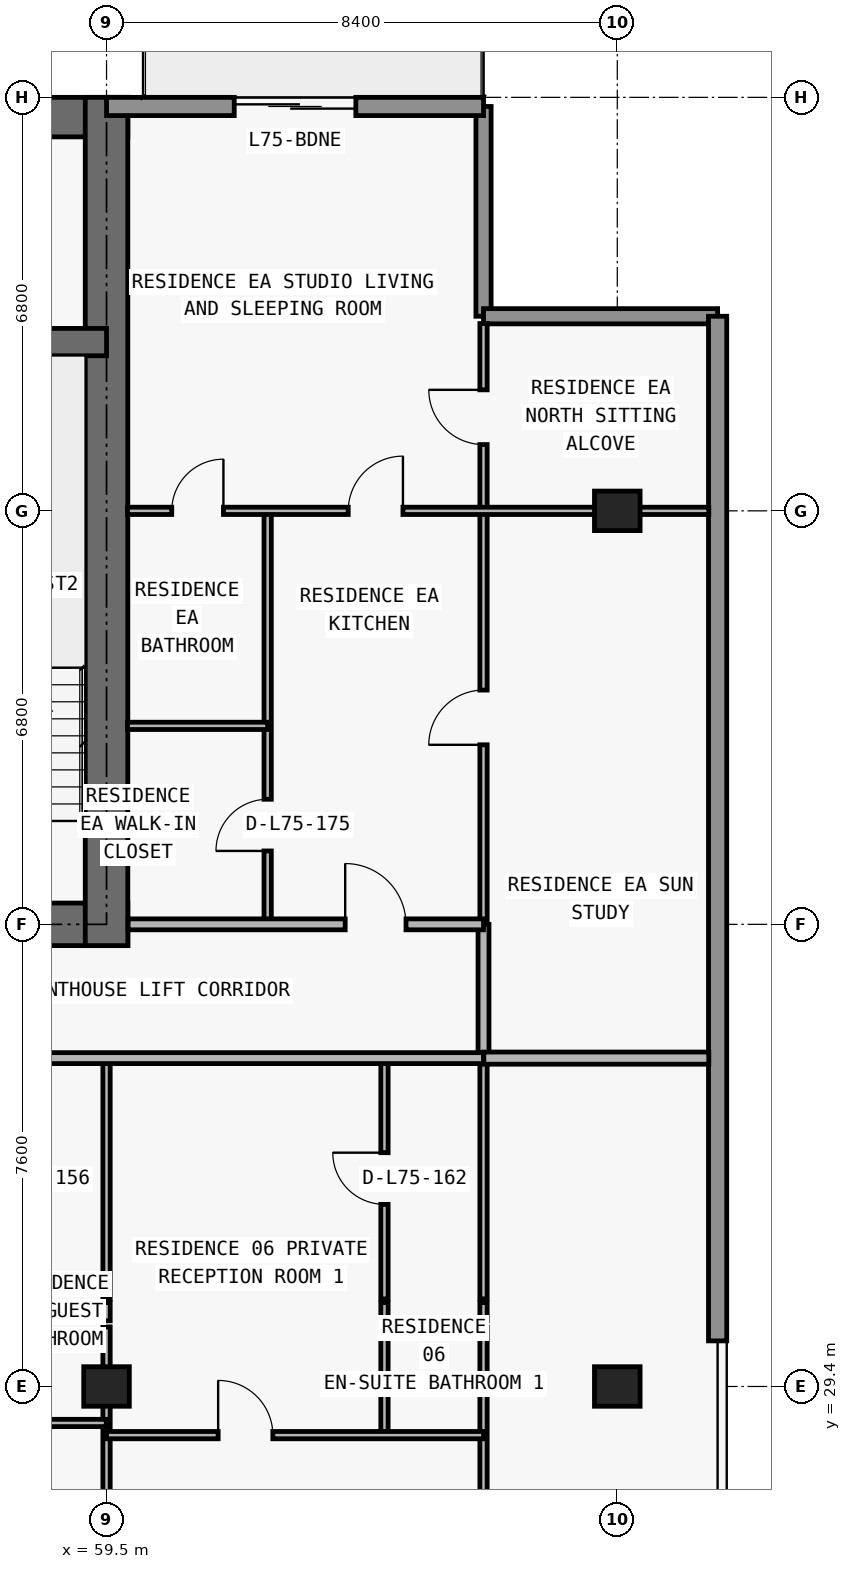
"""IFC4 building model, lengths in metres.
Left out: names, types, materials, properties, quantities, classifications, styles, units other than length and angle.
Written with IfcOpenShell. Run it as: python <this file> out.ifc"""

import sys

from ifc_helpers import new_model, si_unit, direction, frame, frame_2d, origin, origin_2d, place, context, subcontext, project, spatial, rectangle, extrude, element, fill, save


model = new_model("IFC4")
c1 = context("Model", 3, precision=1e-05, world=origin(), true_north=direction((0.0, 1.0)))
c2 = subcontext(c1, "Body", "Model", "MODEL_VIEW")
j1 = project(units=[si_unit("LENGTHUNIT", "METRE"), si_unit("PLANEANGLEUNIT", "RADIAN")], contexts=[c1])
p1 = place(None, origin())
s1 = spatial("IfcSite", under=j1, at=p1, CompositionType="ELEMENT")
p2 = place(p1, origin())
s2 = spatial("IfcBuilding", under=s1, at=p2, CompositionType="ELEMENT")
p3 = place(p2, frame((0.0, 0.0, 266.1)))
s3 = spatial("IfcBuildingStorey", under=s2, at=p3, CompositionType="ELEMENT", Elevation=266.1)
for number, where, z_axis, x_axis in (
    (1, (59.5, 29.4, 0.0), (0.0, 0.0, 1.0), (1.0, 0.0, 0.0)),
    (2, (67.9, 29.4, 0.0), (0.0, 0.0, 1.0), (1.0, 0.0, 0.0)),
    (3, (67.9, 43.8, 0.0), (0.0, 0.0, 1.0), (1.0, 0.0, 0.0)),
):
    element("IfcColumn", number, at=place(p3, frame(where, z_axis=z_axis, x_axis=x_axis)), inside=s3, PredefinedType="COLUMN", context=c2, shape_type="SweptSolid", body=[
        extrude(rectangle(XDim=0.75, YDim=0.65, at=origin_2d()), origin(), (0.0, 0.0, 1.0), 3.0),
    ])
p4 = place(p3, frame((17.95, 37.0, 0.0), z_axis=(0.0, 0.0, 1.0), x_axis=(1.0, 0.0, 0.0)))
e4 = element("IfcWall", 4, at=p4, inside=s3, PredefinedType="SHEAR", context=c2, shape_type="SweptSolid", body=[
    extrude(rectangle(XDim=41.9, YDim=0.7, at=frame_2d((20.95, 0.0))), origin(), (0.0, 0.0, 1.0), 3.0),
])
p5 = place(p4, frame((14.35, 0.0, 0.0)))
e5 = element("IfcOpeningElement", 5, at=p5, cuts=e4, PredefinedType="OPENING", context=c2, shape_type="SweptSolid", body=[
    extrude(rectangle(XDim=1.1, YDim=2.15, at=frame_2d((0.55, 1.075))), frame((0.0, 0.36, 0.0), z_axis=(0.0, -1.0, 0.0), x_axis=(1.0, 0.0, 0.0)), (0.0, 0.0, 1.0), 0.72),
])
p6 = place(p4, frame((6.2, 0.0, 0.0)))
e6 = element("IfcOpeningElement", 6, at=p6, cuts=e4, PredefinedType="OPENING", context=c2, shape_type="SweptSolid", body=[
    extrude(rectangle(XDim=1.05, YDim=2.15, at=frame_2d((0.525, 1.075))), frame((0.0, 0.36, 0.0), z_axis=(0.0, -1.0, 0.0), x_axis=(1.0, 0.0, 0.0)), (0.0, 0.0, 1.0), 0.72),
])
p7 = place(p4, frame((34.7, 0.0, 0.0)))
e7 = element("IfcOpeningElement", 7, at=p7, cuts=e4, PredefinedType="OPENING", context=c2, shape_type="SweptSolid", body=[
    extrude(rectangle(XDim=1.05, YDim=2.15, at=frame_2d((0.525, 1.075))), frame((0.0, 0.36, 0.0), z_axis=(0.0, -1.0, 0.0), x_axis=(1.0, 0.0, 0.0)), (0.0, 0.0, 1.0), 0.72),
])
p8 = place(p4, frame((10.812, 0.0, 0.0)))
e8 = element("IfcOpeningElement", 8, at=p8, cuts=e4, PredefinedType="OPENING", context=c2, shape_type="SweptSolid", body=[
    extrude(rectangle(XDim=1.05, YDim=2.15, at=frame_2d((0.525, 1.075))), frame((0.0, 0.36, 0.0), z_axis=(0.0, -1.0, 0.0), x_axis=(1.0, 0.0, 0.0)), (0.0, 0.0, 1.0), 0.72),
])
p9 = place(p4, frame((24.05, 0.0, 0.0)))
e9 = element("IfcOpeningElement", 9, at=p9, cuts=e4, PredefinedType="OPENING", context=c2, shape_type="SweptSolid", body=[
    extrude(rectangle(XDim=1.05, YDim=2.15, at=frame_2d((0.525, 1.075))), frame((0.0, 0.36, 0.0), z_axis=(0.0, -1.0, 0.0), x_axis=(1.0, 0.0, 0.0)), (0.0, 0.0, 1.0), 0.72),
])
p10 = place(p3, frame((17.95, 50.275, 0.0), z_axis=(0.0, 0.0, 1.0), x_axis=(1.0, 0.0, 0.0)))
e10 = element("IfcWall", 10, at=p10, inside=s3, PredefinedType="SHEAR", context=c2, shape_type="SweptSolid", body=[
    extrude(rectangle(XDim=41.9, YDim=0.65, at=frame_2d((20.95, 0.0))), origin(), (0.0, 0.0, 1.0), 3.0),
])
p11 = place(p3, frame((59.5, 36.65, 0.0), z_axis=(0.0, 0.0, 1.0), x_axis=(0.0, 1.0, 0.0)))
e11 = element("IfcWall", 11, at=p11, inside=s3, PredefinedType="SHEAR", context=c2, shape_type="SweptSolid", body=[
    extrude(rectangle(XDim=13.95, YDim=0.7, at=frame_2d((6.975, 0.0))), origin(), (0.0, 0.0, 1.0), 3.0),
])
p12 = place(p3, frame((18.3, 46.575, 0.0), z_axis=(0.0, 0.0, 1.0), x_axis=(1.0, 0.0, 0.0)))
e12 = element("IfcWall", 12, at=p12, inside=s3, PredefinedType="SHEAR", context=c2, shape_type="SweptSolid", body=[
    extrude(rectangle(XDim=41.2, YDim=0.45, at=frame_2d((20.6, 0.0))), origin(), (0.0, 0.0, 1.0), 3.0),
])
p13 = place(p12, frame((7.6, 0.0, 0.0)))
e13 = element("IfcOpeningElement", 13, at=p13, cuts=e12, PredefinedType="OPENING", context=c2, shape_type="SweptSolid", body=[
    extrude(rectangle(XDim=1.0, YDim=2.2, at=frame_2d((0.5, 1.1))), frame((0.0, 0.235, 0.0), z_axis=(0.0, -1.0, 0.0), x_axis=(1.0, 0.0, 0.0)), (0.0, 0.0, 1.0), 0.47),
])
p14 = place(p12, frame((32.625, 0.0, 0.0)))
e14 = element("IfcOpeningElement", 14, at=p14, cuts=e12, PredefinedType="OPENING", context=c2, shape_type="SweptSolid", body=[
    extrude(rectangle(XDim=1.05, YDim=2.15, at=frame_2d((0.525, 1.075))), frame((0.0, 0.235, 0.0), z_axis=(0.0, -1.0, 0.0), x_axis=(1.0, 0.0, 0.0)), (0.0, 0.0, 1.0), 0.47),
])
p15 = place(p3, frame((65.7, 50.45, 0.0), z_axis=(0.0, 0.0, 1.0), x_axis=(0.0, -1.0, 0.0)))
e15 = element("IfcWall", 15, at=p15, inside=s3, PredefinedType="ELEMENTEDWALL", context=c2, shape_type="SweptSolid", body=[
    extrude(rectangle(XDim=3.45, YDim=0.25, at=frame_2d((1.725, 0.0))), origin(), (0.0, 0.0, 1.0), 3.0),
])
p16 = place(p3, frame((65.7, 47.0, 0.0), z_axis=(0.0, 0.0, 1.0), x_axis=(1.0, 0.0, 0.0)))
e16 = element("IfcWall", 16, at=p16, inside=s3, PredefinedType="ELEMENTEDWALL", context=c2, shape_type="SweptSolid", body=[
    extrude(rectangle(XDim=3.85, YDim=0.25, at=frame_2d((1.925, 0.0))), origin(), (0.0, 0.0, 1.0), 3.0),
])
p17 = place(p3, frame((69.55, 47.0, 0.0), z_axis=(0.0, 0.0, 1.0), x_axis=(0.0, -1.0, 0.0)))
e17 = element("IfcWall", 17, at=p17, inside=s3, PredefinedType="STANDARD", context=c2, shape_type="SweptSolid", body=[
    extrude(rectangle(XDim=16.85, YDim=0.3, at=frame_2d((8.425, 0.0))), origin(), (0.0, 0.0, 1.0), 3.0),
])
p18 = place(p3, frame((59.5, 50.45, 0.0), z_axis=(0.0, 0.0, 1.0), x_axis=(1.0, 0.0, 0.0)))
e18 = element("IfcWall", 18, at=p18, inside=s3, PredefinedType="STANDARD", context=c2, shape_type="SweptSolid", body=[
    extrude(rectangle(XDim=6.2, YDim=0.3, at=frame_2d((3.1, 0.0))), origin(), (0.0, 0.0, 1.0), 3.0),
])
p19 = place(p18, frame((2.1, 0.0, 0.0)))
e19 = element("IfcOpeningElement", 19, at=p19, cuts=e18, PredefinedType="OPENING", context=c2, shape_type="SweptSolid", body=[
    extrude(rectangle(XDim=2.0, YDim=2.3, at=frame_2d((1.0, 1.15))), frame((0.0, 0.16, 0.0), z_axis=(0.0, -1.0, 0.0), x_axis=(1.0, 0.0, 0.0)), (0.0, 0.0, 1.0), 0.32),
])
p20 = place(p3, frame((59.5, 25.69, 0.0), z_axis=(0.0, 0.0, 1.0), x_axis=(0.0, 1.0, 0.0)))
e20 = element("IfcWall", 20, at=p20, inside=s3, PredefinedType="PARTITIONING", context=c2, shape_type="SweptSolid", body=[
    extrude(rectangle(XDim=4.69, YDim=0.12, at=frame_2d((2.345, 0.0))), origin(), (0.0, 0.0, 1.0), 2.213),
])
p21 = place(p20, frame((1.005, 0.0, 0.0)))
e21 = element("IfcOpeningElement", 21, at=p21, cuts=e20, PredefinedType="OPENING", context=c2, shape_type="SweptSolid", body=[
    extrude(rectangle(XDim=0.9, YDim=2.15, at=frame_2d((0.45, 1.075))), frame((0.0, 0.07, 0.0), z_axis=(0.0, -1.0, 0.0), x_axis=(1.0, 0.0, 0.0)), (0.0, 0.0, 1.0), 0.14),
])
p22 = place(p3, frame((59.5, 30.48, 0.0), z_axis=(0.0, 0.0, 1.0), x_axis=(0.0, 1.0, 0.0)))
e22 = element("IfcWall", 22, at=p22, inside=s3, PredefinedType="PARTITIONING", context=c2, shape_type="SweptSolid", body=[
    extrude(rectangle(XDim=0.3, YDim=0.12, at=frame_2d((0.15, 0.0))), origin(), (0.0, 0.0, 1.0), 2.213),
])
p23 = place(p3, frame((59.5, 30.84, 0.0), z_axis=(0.0, 0.0, 1.0), x_axis=(0.0, 1.0, 0.0)))
e23 = element("IfcWall", 23, at=p23, inside=s3, PredefinedType="PARTITIONING", context=c2, shape_type="SweptSolid", body=[
    extrude(rectangle(XDim=3.96, YDim=0.12, at=frame_2d((1.98, 0.0))), origin(), (0.0, 0.0, 1.0), 2.213),
])
p24 = place(p3, frame((62.15, 37.0, 0.0), z_axis=(0.0, 0.0, 1.0), x_axis=(0.0, 1.0, 0.0)))
e24 = element("IfcWall", 24, at=p24, inside=s3, PredefinedType="PARTITIONING", context=c2, shape_type="SweptSolid", body=[
    extrude(rectangle(XDim=6.8, YDim=0.12, at=frame_2d((3.4, 0.0))), origin(), (0.0, 0.0, 1.0), 3.0),
])
p25 = place(p24, frame((1.207, 0.0, 0.0)))
e25 = element("IfcOpeningElement", 25, at=p25, cuts=e24, PredefinedType="OPENING", context=c2, shape_type="SweptSolid", body=[
    extrude(rectangle(XDim=0.85, YDim=2.1, at=frame_2d((0.425, 1.05))), frame((0.0, 0.07, 0.0), z_axis=(0.0, -1.0, 0.0), x_axis=(1.0, 0.0, 0.0)), (0.0, 0.0, 1.0), 0.14),
])
p26 = place(p3, frame((64.071, 28.6, 0.0), z_axis=(0.0, 0.0, 1.0), x_axis=(0.0, 1.0, 0.0)))
e26 = element("IfcWall", 26, at=p26, inside=s3, PredefinedType="PARTITIONING", context=c2, shape_type="SweptSolid", body=[
    extrude(rectangle(XDim=1.78, YDim=0.12, at=frame_2d((0.89, 0.0))), origin(), (0.0, 0.0, 1.0), 3.0),
])
p27 = place(p3, frame((64.071, 30.48, 0.0), z_axis=(0.0, 0.0, 1.0), x_axis=(0.0, 1.0, 0.0)))
e27 = element("IfcWall", 27, at=p27, inside=s3, PredefinedType="PARTITIONING", context=c2, shape_type="SweptSolid", body=[
    extrude(rectangle(XDim=0.3, YDim=0.12, at=frame_2d((0.15, 0.0))), origin(), (0.0, 0.0, 1.0), 3.0),
])
p28 = place(p3, frame((64.071, 30.84, 0.0), z_axis=(0.0, 0.0, 1.0), x_axis=(0.0, 1.0, 0.0)))
e28 = element("IfcWall", 28, at=p28, inside=s3, PredefinedType="PARTITIONING", context=c2, shape_type="SweptSolid", body=[
    extrude(rectangle(XDim=3.96, YDim=0.12, at=frame_2d((1.98, 0.0))), origin(), (0.0, 0.0, 1.0), 3.0),
])
p29 = place(p28, frame((1.555, 0.0, 0.0)))
e29 = element("IfcOpeningElement", 29, at=p29, cuts=e28, PredefinedType="OPENING", context=c2, shape_type="SweptSolid", body=[
    extrude(rectangle(XDim=0.85, YDim=2.1, at=frame_2d((0.425, 1.05))), frame((0.0, 0.07, 0.0), z_axis=(0.0, -1.0, 0.0), x_axis=(1.0, 0.0, 0.0)), (0.0, 0.0, 1.0), 0.14),
])
p30 = place(p3, frame((65.7, 25.69, 0.0), z_axis=(0.0, 0.0, 1.0), x_axis=(0.0, 1.0, 0.0)))
e30 = element("IfcWall", 30, at=p30, inside=s3, PredefinedType="PARTITIONING", context=c2, shape_type="SweptSolid", body=[
    extrude(rectangle(XDim=4.69, YDim=0.12, at=frame_2d((2.345, 0.0))), origin(), (0.0, 0.0, 1.0), 3.0),
])
p31 = place(p30, frame((1.005, 0.0, 0.0)))
e31 = element("IfcOpeningElement", 31, at=p31, cuts=e30, PredefinedType="OPENING", context=c2, shape_type="SweptSolid", body=[
    extrude(rectangle(XDim=0.9, YDim=2.15, at=frame_2d((0.45, 1.075))), frame((0.0, 0.07, 0.0), z_axis=(0.0, -1.0, 0.0), x_axis=(1.0, 0.0, 0.0)), (0.0, 0.0, 1.0), 0.14),
])
p32 = place(p3, frame((65.7, 30.48, 0.0), z_axis=(0.0, 0.0, 1.0), x_axis=(0.0, 1.0, 0.0)))
e32 = element("IfcWall", 32, at=p32, inside=s3, PredefinedType="PARTITIONING", context=c2, shape_type="SweptSolid", body=[
    extrude(rectangle(XDim=0.3, YDim=0.12, at=frame_2d((0.15, 0.0))), origin(), (0.0, 0.0, 1.0), 3.0),
])
p33 = place(p3, frame((65.7, 30.84, 0.0), z_axis=(0.0, 0.0, 1.0), x_axis=(0.0, 1.0, 0.0)))
e33 = element("IfcWall", 33, at=p33, inside=s3, PredefinedType="PARTITIONING", context=c2, shape_type="SweptSolid", body=[
    extrude(rectangle(XDim=3.96, YDim=0.12, at=frame_2d((1.98, 0.0))), origin(), (0.0, 0.0, 1.0), 3.0),
])
p34 = place(p3, frame((65.7, 34.805, 0.0), z_axis=(0.0, 0.0, 1.0), x_axis=(0.0, 1.0, 0.0)))
e34 = element("IfcWall", 34, at=p34, inside=s3, PredefinedType="PARTITIONING", context=c2, shape_type="SweptSolid", body=[
    extrude(rectangle(XDim=2.195, YDim=0.18, at=frame_2d((1.098, 0.0))), origin(), (0.0, 0.0, 1.0), 3.0),
])
p35 = place(p3, frame((65.7, 37.005, 0.0), z_axis=(0.0, 0.0, 1.0), x_axis=(0.0, 1.0, 0.0)))
e35 = element("IfcWall", 35, at=p35, inside=s3, PredefinedType="PARTITIONING", context=c2, shape_type="SweptSolid", body=[
    extrude(rectangle(XDim=9.875, YDim=0.12, at=frame_2d((4.938, 0.0))), origin(), (0.0, 0.0, 1.0), 3.0),
])
p36 = place(p35, frame((2.948, 0.0, 0.0)))
e36 = element("IfcOpeningElement", 36, at=p36, cuts=e35, PredefinedType="OPENING", context=c2, shape_type="SweptSolid", body=[
    extrude(rectangle(XDim=0.9, YDim=2.15, at=frame_2d((0.45, 1.075))), frame((0.0, 0.07, 0.0), z_axis=(0.0, -1.0, 0.0), x_axis=(1.0, 0.0, 0.0)), (0.0, 0.0, 1.0), 0.14),
])
p37 = place(p35, frame((7.885, 0.0, 0.0)))
e37 = element("IfcOpeningElement", 37, at=p37, cuts=e35, PredefinedType="OPENING", context=c2, shape_type="SweptSolid", body=[
    extrude(rectangle(XDim=0.9, YDim=2.15, at=frame_2d((0.45, 1.075))), frame((0.0, 0.07, 0.0), z_axis=(0.0, -1.0, 0.0), x_axis=(1.0, 0.0, 0.0)), (0.0, 0.0, 1.0), 0.14),
])
p38 = place(p3, frame((59.5, 28.6, 0.0), z_axis=(0.0, 0.0, 1.0), x_axis=(1.0, 0.0, 0.0)))
e38 = element("IfcWall", 38, at=p38, inside=s3, PredefinedType="PARTITIONING", context=c2, shape_type="SweptSolid", body=[
    extrude(rectangle(XDim=6.2, YDim=0.12, at=frame_2d((3.1, 0.0))), origin(), (0.0, 0.0, 1.0), 3.0),
])
p39 = place(p38, frame((1.835, 0.0, 0.0)))
e39 = element("IfcOpeningElement", 39, at=p39, cuts=e38, PredefinedType="OPENING", context=c2, shape_type="SweptSolid", body=[
    extrude(rectangle(XDim=0.9, YDim=2.15, at=frame_2d((0.45, 1.075))), frame((0.0, 0.07, 0.0), z_axis=(0.0, -1.0, 0.0), x_axis=(1.0, 0.0, 0.0)), (0.0, 0.0, 1.0), 0.14),
])
p40 = place(p3, frame((51.32, 28.8, 0.0), z_axis=(0.0, 0.0, 1.0), x_axis=(1.0, 0.0, 0.0)))
e40 = element("IfcWall", 40, at=p40, inside=s3, PredefinedType="PARTITIONING", context=c2, shape_type="SweptSolid", body=[
    extrude(rectangle(XDim=8.175, YDim=0.12, at=frame_2d((4.087, 0.0))), origin(), (0.0, 0.0, 1.0), 3.0),
])
p41 = place(p40, frame((1.204, 0.0, 0.0)))
e41 = element("IfcOpeningElement", 41, at=p41, cuts=e40, PredefinedType="OPENING", context=c2, shape_type="SweptSolid", body=[
    extrude(rectangle(XDim=0.9, YDim=2.15, at=frame_2d((0.45, 1.075))), frame((0.0, 0.07, 0.0), z_axis=(0.0, -1.0, 0.0), x_axis=(1.0, 0.0, 0.0)), (0.0, 0.0, 1.0), 0.14),
])
p42 = place(p3, frame((31.5, 34.8, 0.0), z_axis=(0.0, 0.0, 1.0), x_axis=(1.0, 0.0, 0.0)))
e42 = element("IfcWall", 42, at=p42, inside=s3, PredefinedType="PARTITIONING", context=c2, shape_type="SweptSolid", body=[
    extrude(rectangle(XDim=34.2, YDim=0.18, at=frame_2d((17.1, 0.0))), origin(), (0.0, 0.0, 1.0), 3.0),
])
p43 = place(p42, frame((5.6, 0.0, 0.0)))
e43 = element("IfcOpeningElement", 43, at=p43, cuts=e42, PredefinedType="OPENING", context=c2, shape_type="SweptSolid", body=[
    extrude(rectangle(XDim=1.0, YDim=2.2, at=frame_2d((0.5, 1.1))), frame((0.0, 0.1, 0.0), z_axis=(0.0, -1.0, 0.0), x_axis=(1.0, 0.0, 0.0)), (0.0, 0.0, 1.0), 0.2),
])
p44 = place(p42, frame((13.799, 0.0, 0.0)))
e44 = element("IfcOpeningElement", 44, at=p44, cuts=e42, PredefinedType="OPENING", context=c2, shape_type="SweptSolid", body=[
    extrude(rectangle(XDim=1.0, YDim=2.2, at=frame_2d((0.5, 1.1))), frame((0.0, 0.1, 0.0), z_axis=(0.0, -1.0, 0.0), x_axis=(1.0, 0.0, 0.0)), (0.0, 0.0, 1.0), 0.2),
])
p45 = place(p42, frame((22.483, 0.0, 0.0)))
e45 = element("IfcOpeningElement", 45, at=p45, cuts=e42, PredefinedType="OPENING", context=c2, shape_type="SweptSolid", body=[
    extrude(rectangle(XDim=1.0, YDim=2.2, at=frame_2d((0.5, 1.1))), frame((0.0, 0.1, 0.0), z_axis=(0.0, -1.0, 0.0), x_axis=(1.0, 0.0, 0.0)), (0.0, 0.0, 1.0), 0.2),
])
p46 = place(p3, frame((65.705, 34.8, 0.0), z_axis=(0.0, 0.0, 1.0), x_axis=(1.0, 0.0, 0.0)))
e46 = element("IfcWall", 46, at=p46, inside=s3, PredefinedType="PARTITIONING", context=c2, shape_type="SweptSolid", body=[
    extrude(rectangle(XDim=3.7, YDim=0.2, at=frame_2d((1.85, 0.0))), origin(), (0.0, 0.0, 1.0), 3.0),
])
p47 = place(p3, frame((59.855, 37.0, 0.0), z_axis=(0.0, 0.0, 1.0), x_axis=(1.0, 0.0, 0.0)))
e47 = element("IfcWall", 47, at=p47, inside=s3, PredefinedType="PARTITIONING", context=c2, shape_type="SweptSolid", body=[
    extrude(rectangle(XDim=5.845, YDim=0.18, at=frame_2d((2.922, 0.0))), origin(), (0.0, 0.0, 1.0), 3.0),
])
p48 = place(p47, frame((3.57, 0.0, 0.0)))
e48 = element("IfcOpeningElement", 48, at=p48, cuts=e47, PredefinedType="OPENING", context=c2, shape_type="SweptSolid", body=[
    extrude(rectangle(XDim=1.0, YDim=2.2, at=frame_2d((0.5, 1.1))), frame((0.0, 0.1, 0.0), z_axis=(0.0, -1.0, 0.0), x_axis=(1.0, 0.0, 0.0)), (0.0, 0.0, 1.0), 0.2),
])
p49 = place(p3, frame((59.845, 40.264, 0.0), z_axis=(0.0, 0.0, 1.0), x_axis=(1.0, 0.0, 0.0)))
e49 = element("IfcWall", 49, at=p49, inside=s3, PredefinedType="PARTITIONING", context=c2, shape_type="SweptSolid", body=[
    extrude(rectangle(XDim=2.305, YDim=0.12, at=frame_2d((1.152, 0.0))), origin(), (0.0, 0.0, 1.0), 3.0),
])
p50 = place(p3, frame((59.845, 43.8, 0.0), z_axis=(0.0, 0.0, 1.0), x_axis=(1.0, 0.0, 0.0)))
e50 = element("IfcWall", 50, at=p50, inside=s3, PredefinedType="PARTITIONING", context=c2, shape_type="SweptSolid", body=[
    extrude(rectangle(XDim=9.56, YDim=0.12, at=frame_2d((4.78, 0.0))), origin(), (0.0, 0.0, 1.0), 2.368),
])
p51 = place(p50, frame((3.63, 0.0, 0.0)))
e51 = element("IfcOpeningElement", 51, at=p51, cuts=e50, PredefinedType="OPENING", context=c2, shape_type="SweptSolid", body=[
    extrude(rectangle(XDim=0.9, YDim=2.15, at=frame_2d((0.45, 1.075))), frame((0.0, 0.07, 0.0), z_axis=(0.0, -1.0, 0.0), x_axis=(1.0, 0.0, 0.0)), (0.0, 0.0, 1.0), 0.14),
])
p52 = place(p50, frame((0.728, 0.0, 0.0)))
e52 = element("IfcOpeningElement", 52, at=p52, cuts=e50, PredefinedType="OPENING", context=c2, shape_type="SweptSolid", body=[
    extrude(rectangle(XDim=0.85, YDim=2.1, at=frame_2d((0.425, 1.05))), frame((0.0, 0.07, 0.0), z_axis=(0.0, -1.0, 0.0), x_axis=(1.0, 0.0, 0.0)), (0.0, 0.0, 1.0), 0.14),
])
p53 = place(p19, origin())
e53 = element("IfcDoor", 53, at=p53, inside=s3, OperationType="DOUBLE_DOOR_SLIDING", PredefinedType="DOOR", context=c2, shape_type="SweptSolid", body=[
    extrude(rectangle(XDim=2.0, YDim=2.3, at=frame_2d((1.0, 1.15))), frame((0.0, 0.025, 0.0), z_axis=(0.0, -1.0, 0.0), x_axis=(1.0, 0.0, 0.0)), (0.0, 0.0, 1.0), 0.05),
])
fill(e19, e53)
p54 = place(p39, origin())
e54 = element("IfcDoor", 54, at=p54, inside=s3, OperationType="SINGLE_SWING_LEFT", PredefinedType="DOOR", context=c2, shape_type="SweptSolid", body=[
    extrude(rectangle(XDim=0.9, YDim=2.15, at=frame_2d((0.45, 1.075))), frame((0.0, 0.025, 0.0), z_axis=(0.0, -1.0, 0.0), x_axis=(1.0, 0.0, 0.0)), (0.0, 0.0, 1.0), 0.05),
])
fill(e39, e54)
p55 = place(p29, origin())
e55 = element("IfcDoor", 55, at=p55, inside=s3, OperationType="SINGLE_SWING_RIGHT", PredefinedType="DOOR", context=c2, shape_type="SweptSolid", body=[
    extrude(rectangle(XDim=0.85, YDim=2.1, at=frame_2d((0.425, 1.05))), frame((0.0, 0.025, 0.0), z_axis=(0.0, -1.0, 0.0), x_axis=(1.0, 0.0, 0.0)), (0.0, 0.0, 1.0), 0.05),
])
fill(e29, e55)
p56 = place(p48, origin())
e56 = element("IfcDoor", 56, at=p56, inside=s3, OperationType="SINGLE_SWING_LEFT", PredefinedType="DOOR", context=c2, shape_type="SweptSolid", body=[
    extrude(rectangle(XDim=1.0, YDim=2.2, at=frame_2d((0.5, 1.1))), frame((0.0, 0.025, 0.0), z_axis=(0.0, -1.0, 0.0), x_axis=(1.0, 0.0, 0.0)), (0.0, 0.0, 1.0), 0.05),
])
fill(e48, e56)
p57 = place(p51, origin())
e57 = element("IfcDoor", 57, at=p57, inside=s3, OperationType="SINGLE_SWING_RIGHT", PredefinedType="DOOR", context=c2, shape_type="SweptSolid", body=[
    extrude(rectangle(XDim=0.9, YDim=2.15, at=frame_2d((0.45, 1.075))), frame((0.0, 0.025, 0.0), z_axis=(0.0, -1.0, 0.0), x_axis=(1.0, 0.0, 0.0)), (0.0, 0.0, 1.0), 0.05),
])
fill(e51, e57)
p58 = place(p25, origin())
e58 = element("IfcDoor", 58, at=p58, inside=s3, OperationType="SINGLE_SWING_LEFT", PredefinedType="DOOR", context=c2, shape_type="SweptSolid", body=[
    extrude(rectangle(XDim=0.85, YDim=2.1, at=frame_2d((0.425, 1.05))), frame((0.0, 0.025, 0.0), z_axis=(0.0, -1.0, 0.0), x_axis=(1.0, 0.0, 0.0)), (0.0, 0.0, 1.0), 0.05),
])
fill(e25, e58)
p59 = place(p52, origin())
e59 = element("IfcDoor", 59, at=p59, inside=s3, OperationType="SINGLE_SWING_RIGHT", PredefinedType="DOOR", context=c2, shape_type="SweptSolid", body=[
    extrude(rectangle(XDim=0.85, YDim=2.1, at=frame_2d((0.425, 1.05))), frame((0.0, 0.025, 0.0), z_axis=(0.0, -1.0, 0.0), x_axis=(1.0, 0.0, 0.0)), (0.0, 0.0, 1.0), 0.05),
])
fill(e52, e59)
p60 = place(p36, origin())
e60 = element("IfcDoor", 60, at=p60, inside=s3, OperationType="SINGLE_SWING_LEFT", PredefinedType="DOOR", context=c2, shape_type="SweptSolid", body=[
    extrude(rectangle(XDim=0.9, YDim=2.15, at=frame_2d((0.45, 1.075))), frame((0.0, 0.025, 0.0), z_axis=(0.0, -1.0, 0.0), x_axis=(1.0, 0.0, 0.0)), (0.0, 0.0, 1.0), 0.05),
])
fill(e36, e60)
p61 = place(p37, origin())
e61 = element("IfcDoor", 61, at=p61, inside=s3, OperationType="SINGLE_SWING_RIGHT", PredefinedType="DOOR", context=c2, shape_type="SweptSolid", body=[
    extrude(rectangle(XDim=0.9, YDim=2.15, at=frame_2d((0.45, 1.075))), frame((0.0, 0.025, 0.0), z_axis=(0.0, -1.0, 0.0), x_axis=(1.0, 0.0, 0.0)), (0.0, 0.0, 1.0), 0.05),
])
fill(e37, e61)
save(model, sys.argv[1])
